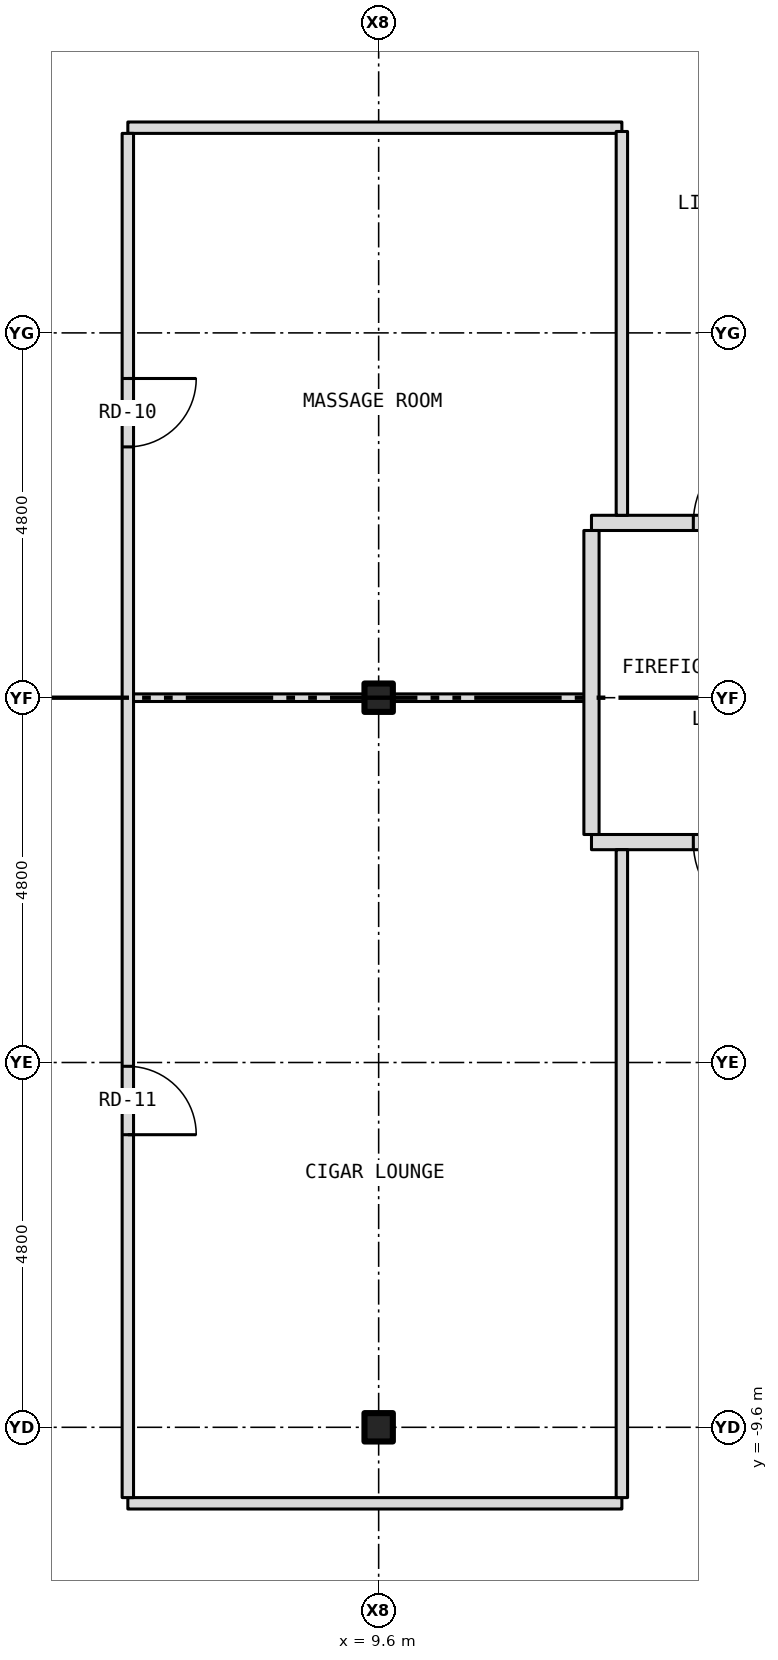
"""IFC4 building model, lengths in metres.
Left out: names, types, materials, properties, quantities, classifications, styles, units other than length and angle.
Written with IfcOpenShell. Run it as: python <this file> out.ifc"""

import sys

from ifc_helpers import new_model, si_unit, direction, frame, frame_2d, origin, origin_2d, place, context, subcontext, project, spatial, rectangle, i_section, extrude, element, fill, save


model = new_model("IFC4")
c1 = context("Model", 3, precision=1e-05, world=origin(), true_north=direction((0.0, 1.0)))
c2 = subcontext(c1, "Body", "Model", "MODEL_VIEW")
j1 = project(units=[si_unit("LENGTHUNIT", "METRE"), si_unit("PLANEANGLEUNIT", "RADIAN")], contexts=[c1])
p1 = place(None, origin())
s1 = spatial("IfcSite", under=j1, at=p1, CompositionType="ELEMENT")
p2 = place(p1, origin())
s2 = spatial("IfcBuilding", under=s1, at=p2, CompositionType="ELEMENT")
p3 = place(p2, frame((0.0, 0.0, 198.0)))
s3 = spatial("IfcBuildingStorey", under=s2, at=p3, CompositionType="ELEMENT", Elevation=198.0)
for number, where, z_axis, x_axis in (
    (1, (9.6, -9.6, -0.15), (0.0, 0.0, 1.0), (1.0, 0.0, 0.0)),
    (2, (9.6, 0.0, -0.15), (0.0, 0.0, 1.0), (1.0, 0.0, 0.0)),
):
    element("IfcColumn", number, at=place(p3, frame(where, z_axis=z_axis, x_axis=x_axis)), inside=s3, PredefinedType="COLUMN", context=c2, shape_type="SweptSolid", body=[
        extrude(i_section(OverallWidth=0.373, OverallDepth=0.373, WebThickness=0.016, FlangeThickness=0.026, at=origin_2d()), origin(), (0.0, 0.0, 1.0), 3.5),
    ])
p4 = place(p3, frame((6.3, -10.6, 0.0), z_axis=(0.0, 0.0, 1.0), x_axis=(1.0, 0.0, 0.0)))
e3 = element("IfcWall", 3, at=p4, inside=s3, PredefinedType="PARTITIONING", context=c2, shape_type="SweptSolid", body=[
    extrude(rectangle(XDim=6.5, YDim=0.15, at=frame_2d((3.25, 0.0))), origin(), (0.0, 0.0, 1.0), 3.35),
])
p5 = place(p3, frame((12.4, -1.9, 0.0), z_axis=(0.0, 0.0, 1.0), x_axis=(1.0, 0.0, 0.0)))
e4 = element("IfcWall", 4, at=p5, inside=s3, PredefinedType="PARTITIONING", context=c2, shape_type="SweptSolid", body=[
    extrude(rectangle(XDim=3.28, YDim=0.2, at=frame_2d((1.64, 0.0))), origin(), (0.0, 0.0, 1.0), 3.35),
])
p6 = place(p5, frame((1.34, 0.0, 0.0)))
e5 = element("IfcOpeningElement", 5, at=p6, cuts=e4, PredefinedType="OPENING", context=c2, shape_type="SweptSolid", body=[
    extrude(rectangle(XDim=1.1, YDim=2.1, at=frame_2d((0.55, 1.05))), frame((0.0, 0.112, 0.0), z_axis=(0.0, -1.0, 0.0), x_axis=(1.0, 0.0, 0.0)), (0.0, 0.0, 1.0), 0.224),
])
p7 = place(p3, frame((6.3, 0.0, 0.0), z_axis=(0.0, 0.0, 1.0), x_axis=(1.0, 0.0, 0.0)))
e6 = element("IfcWall", 6, at=p7, inside=s3, PredefinedType="PARTITIONING", context=c2, shape_type="SweptSolid", body=[
    extrude(rectangle(XDim=3.113, YDim=0.1, at=frame_2d((1.557, 0.0))), origin(), (0.0, 0.0, 1.0), 2.728),
])
p8 = place(p3, frame((9.413, 0.0, 0.0), z_axis=(0.0, 0.0, 1.0), x_axis=(1.0, 0.0, 0.0)))
e7 = element("IfcWall", 7, at=p8, inside=s3, PredefinedType="PARTITIONING", context=c2, shape_type="SweptSolid", body=[
    extrude(rectangle(XDim=0.374, YDim=0.1, at=frame_2d((0.187, 0.0))), origin(), (0.0, 0.0, 1.0), 3.35),
])
p9 = place(p3, frame((9.787, 0.0, 0.0), z_axis=(0.0, 0.0, 1.0), x_axis=(1.0, 0.0, 0.0)))
e8 = element("IfcWall", 8, at=p9, inside=s3, PredefinedType="PARTITIONING", context=c2, shape_type="SweptSolid", body=[
    extrude(rectangle(XDim=2.613, YDim=0.1, at=frame_2d((1.306, 0.0))), origin(), (0.0, 0.0, 1.0), 2.728),
])
p10 = place(p3, frame((12.4, 2.3, 0.0), z_axis=(0.0, 0.0, 1.0), x_axis=(1.0, 0.0, 0.0)))
e9 = element("IfcWall", 9, at=p10, inside=s3, PredefinedType="PARTITIONING", context=c2, shape_type="SweptSolid", body=[
    extrude(rectangle(XDim=3.28, YDim=0.2, at=frame_2d((1.64, 0.0))), origin(), (0.0, 0.0, 1.0), 3.35),
])
p11 = place(p10, frame((1.34, 0.0, 0.0)))
e10 = element("IfcOpeningElement", 10, at=p11, cuts=e9, PredefinedType="OPENING", context=c2, shape_type="SweptSolid", body=[
    extrude(rectangle(XDim=1.1, YDim=2.1, at=frame_2d((0.55, 1.05))), frame((0.0, 0.112, 0.0), z_axis=(0.0, -1.0, 0.0), x_axis=(1.0, 0.0, 0.0)), (0.0, 0.0, 1.0), 0.224),
])
p12 = place(p3, frame((6.3, 7.5, 0.0), z_axis=(0.0, 0.0, 1.0), x_axis=(1.0, 0.0, 0.0)))
e11 = element("IfcWall", 11, at=p12, inside=s3, PredefinedType="PARTITIONING", context=c2, shape_type="SweptSolid", body=[
    extrude(rectangle(XDim=6.5, YDim=0.15, at=frame_2d((3.25, 0.0))), origin(), (0.0, 0.0, 1.0), 3.35),
])
p13 = place(p3, frame((6.3, -10.525, 0.0), z_axis=(0.0, 0.0, 1.0), x_axis=(0.0, 1.0, 0.0)))
e12 = element("IfcWall", 12, at=p13, inside=s3, PredefinedType="PARTITIONING", context=c2, shape_type="SweptSolid", body=[
    extrude(rectangle(XDim=17.95, YDim=0.15, at=frame_2d((8.975, 0.0))), origin(), (0.0, 0.0, 1.0), 3.35),
])
p14 = place(p13, frame((13.825, 0.0, 0.0)))
e13 = element("IfcOpeningElement", 13, at=p14, cuts=e12, PredefinedType="OPENING", context=c2, shape_type="SweptSolid", body=[
    extrude(rectangle(XDim=0.9, YDim=2.1, at=frame_2d((0.45, 1.05))), frame((0.0, 0.087, 0.0), z_axis=(0.0, -1.0, 0.0), x_axis=(1.0, 0.0, 0.0)), (0.0, 0.0, 1.0), 0.174),
])
p15 = place(p13, frame((4.775, 0.0, 0.0)))
e14 = element("IfcOpeningElement", 14, at=p15, cuts=e12, PredefinedType="OPENING", context=c2, shape_type="SweptSolid", body=[
    extrude(rectangle(XDim=0.9, YDim=2.1, at=frame_2d((0.45, 1.05))), frame((0.0, 0.087, 0.0), z_axis=(0.0, -1.0, 0.0), x_axis=(1.0, 0.0, 0.0)), (0.0, 0.0, 1.0), 0.174),
])
p16 = place(p3, frame((12.4, -1.8, 0.0), z_axis=(0.0, 0.0, 1.0), x_axis=(0.0, 1.0, 0.0)))
e15 = element("IfcWall", 15, at=p16, inside=s3, PredefinedType="PARTITIONING", context=c2, shape_type="SweptSolid", body=[
    extrude(rectangle(XDim=4.0, YDim=0.2, at=frame_2d((2.0, 0.0))), origin(), (0.0, 0.0, 1.0), 3.35),
])
p17 = place(p3, frame((12.8, -10.525, 0.0), z_axis=(0.0, 0.0, 1.0), x_axis=(0.0, 1.0, 0.0)))
e16 = element("IfcWall", 16, at=p17, inside=s3, PredefinedType="PARTITIONING", context=c2, shape_type="SweptSolid", body=[
    extrude(rectangle(XDim=8.525, YDim=0.15, at=frame_2d((4.262, 0.0))), origin(), (0.0, 0.0, 1.0), 3.35),
])
p18 = place(p3, frame((12.8, 2.4, 0.0), z_axis=(0.0, 0.0, 1.0), x_axis=(0.0, 1.0, 0.0)))
e17 = element("IfcWall", 17, at=p18, inside=s3, PredefinedType="PARTITIONING", context=c2, shape_type="SweptSolid", body=[
    extrude(rectangle(XDim=5.05, YDim=0.15, at=frame_2d((2.525, 0.0))), origin(), (0.0, 0.0, 1.0), 3.35),
])
p19 = place(p11, origin())
e18 = element("IfcDoor", 18, at=p19, inside=s3, OperationType="SINGLE_SWING_RIGHT", PredefinedType="DOOR", context=c2, shape_type="SweptSolid", body=[
    extrude(rectangle(XDim=1.1, YDim=2.1, at=frame_2d((0.55, 1.05))), frame((0.0, 0.025, 0.0), z_axis=(0.0, -1.0, 0.0), x_axis=(1.0, 0.0, 0.0)), (0.0, 0.0, 1.0), 0.05),
])
fill(e10, e18)
p20 = place(p6, origin())
e19 = element("IfcDoor", 19, at=p20, inside=s3, OperationType="SINGLE_SWING_RIGHT", PredefinedType="DOOR", context=c2, shape_type="SweptSolid", body=[
    extrude(rectangle(XDim=1.1, YDim=2.1, at=frame_2d((0.55, 1.05))), frame((0.0, 0.025, 0.0), z_axis=(0.0, -1.0, 0.0), x_axis=(1.0, 0.0, 0.0)), (0.0, 0.0, 1.0), 0.05),
])
fill(e5, e19)
p21 = place(p14, origin())
e20 = element("IfcDoor", 20, at=p21, inside=s3, OperationType="SINGLE_SWING_RIGHT", PredefinedType="DOOR", context=c2, shape_type="SweptSolid", body=[
    extrude(rectangle(XDim=0.9, YDim=2.1, at=frame_2d((0.45, 1.05))), frame((0.0, 0.025, 0.0), z_axis=(0.0, -1.0, 0.0), x_axis=(1.0, 0.0, 0.0)), (0.0, 0.0, 1.0), 0.05),
])
fill(e13, e20)
p22 = place(p15, origin())
e21 = element("IfcDoor", 21, at=p22, inside=s3, OperationType="SINGLE_SWING_LEFT", PredefinedType="DOOR", context=c2, shape_type="SweptSolid", body=[
    extrude(rectangle(XDim=0.9, YDim=2.1, at=frame_2d((0.45, 1.05))), frame((0.0, 0.025, 0.0), z_axis=(0.0, -1.0, 0.0), x_axis=(1.0, 0.0, 0.0)), (0.0, 0.0, 1.0), 0.05),
])
fill(e14, e21)
save(model, sys.argv[1])
